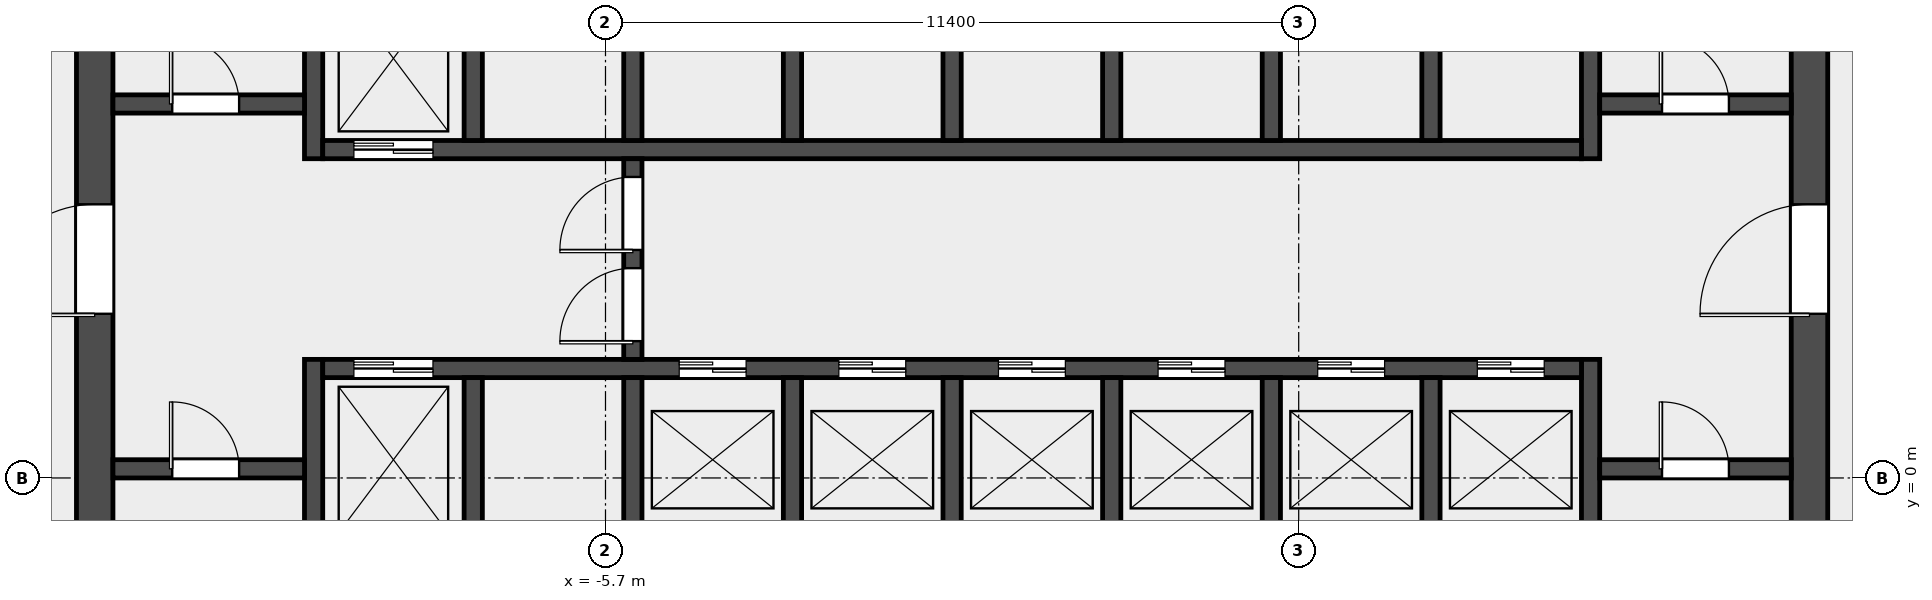
"""IFC4 building model, lengths in metres.
Left out: names, types, materials, properties, quantities, classifications, styles, units other than length and angle.
Written with IfcOpenShell. Run it as: python <this file> out.ifc"""

import sys

from ifc_helpers import new_model, si_unit, direction, frame, frame_2d, origin, place, context, subcontext, project, spatial, rectangle, extrude, element, fill, save


model = new_model("IFC4")
c1 = context("Model", 3, precision=1e-05, world=origin(), true_north=direction((0.0, 1.0)))
c2 = subcontext(c1, "Body", "Model", "MODEL_VIEW")
j1 = project(units=[si_unit("LENGTHUNIT", "METRE"), si_unit("PLANEANGLEUNIT", "RADIAN")], contexts=[c1])
p1 = place(None, origin())
s1 = spatial("IfcSite", under=j1, at=p1, CompositionType="ELEMENT")
p2 = place(p1, origin())
s2 = spatial("IfcBuilding", under=s1, at=p2, CompositionType="ELEMENT")
p3 = place(p2, frame((0.0, 0.0, 64.6)))
s3 = spatial("IfcBuildingStorey", under=s2, at=p3, CompositionType="ELEMENT", Elevation=64.6)
p4 = place(p3, frame((-14.1, -6.6, 0.0), z_axis=(0.0, 0.0, 1.0), x_axis=(0.0, 1.0, 0.0)))
e1 = element("IfcWall", 1, at=p4, inside=s3, PredefinedType="SHEAR", context=c2, shape_type="SweptSolid", body=[
    extrude(rectangle(XDim=19.5, YDim=0.6, at=frame_2d((9.75, 0.0))), origin(), (0.0, 0.0, 1.0), 4.5),
])
p5 = place(p4, frame((9.3, 0.0, 0.0)))
e2 = element("IfcOpeningElement", 2, at=p5, cuts=e1, PredefinedType="OPENING", context=c2, shape_type="SweptSolid", body=[
    extrude(rectangle(XDim=1.8, YDim=2.1, at=frame_2d((0.9, 1.05))), frame((0.0, 0.312, 0.0), z_axis=(0.0, -1.0, 0.0), x_axis=(1.0, 0.0, 0.0)), (0.0, 0.0, 1.0), 0.624),
])
p6 = place(p3, frame((14.1, -6.6, 0.0), z_axis=(0.0, 0.0, 1.0), x_axis=(0.0, 1.0, 0.0)))
e3 = element("IfcWall", 3, at=p6, inside=s3, PredefinedType="SHEAR", context=c2, shape_type="SweptSolid", body=[
    extrude(rectangle(XDim=19.5, YDim=0.6, at=frame_2d((9.75, 0.0))), origin(), (0.0, 0.0, 1.0), 4.5),
])
p7 = place(p6, frame((9.3, 0.0, 0.0)))
e4 = element("IfcOpeningElement", 4, at=p7, cuts=e3, PredefinedType="OPENING", context=c2, shape_type="SweptSolid", body=[
    extrude(rectangle(XDim=1.8, YDim=2.1, at=frame_2d((0.9, 1.05))), frame((0.0, 0.312, 0.0), z_axis=(0.0, -1.0, 0.0), x_axis=(1.0, 0.0, 0.0)), (0.0, 0.0, 1.0), 0.624),
])
p8 = place(p3, frame((-10.5, -6.6, 0.0), z_axis=(0.0, 0.0, 1.0), x_axis=(0.0, 1.0, 0.0)))
e5 = element("IfcWall", 5, at=p8, inside=s3, PredefinedType="SHEAR", context=c2, shape_type="SweptSolid", body=[
    extrude(rectangle(XDim=8.55, YDim=0.3, at=frame_2d((4.275, 0.0))), origin(), (0.0, 0.0, 1.0), 4.5),
])
p9 = place(p3, frame((-10.5, 5.25, 0.0), z_axis=(0.0, 0.0, 1.0), x_axis=(0.0, 1.0, 0.0)))
e6 = element("IfcWall", 6, at=p9, inside=s3, PredefinedType="SHEAR", context=c2, shape_type="SweptSolid", body=[
    extrude(rectangle(XDim=7.65, YDim=0.3, at=frame_2d((3.825, 0.0))), origin(), (0.0, 0.0, 1.0), 4.5),
])
p10 = place(p3, frame((10.5, -6.6, 0.0), z_axis=(0.0, 0.0, 1.0), x_axis=(0.0, 1.0, 0.0)))
e7 = element("IfcWall", 7, at=p10, inside=s3, PredefinedType="SHEAR", context=c2, shape_type="SweptSolid", body=[
    extrude(rectangle(XDim=8.55, YDim=0.3, at=frame_2d((4.275, 0.0))), origin(), (0.0, 0.0, 1.0), 4.5),
])
p11 = place(p3, frame((10.5, 5.25, 0.0), z_axis=(0.0, 0.0, 1.0), x_axis=(0.0, 1.0, 0.0)))
e8 = element("IfcWall", 8, at=p11, inside=s3, PredefinedType="SHEAR", context=c2, shape_type="SweptSolid", body=[
    extrude(rectangle(XDim=7.65, YDim=0.3, at=frame_2d((3.825, 0.0))), origin(), (0.0, 0.0, 1.0), 4.5),
])
p12 = place(p3, frame((-13.8, 0.15, 0.0), z_axis=(0.0, 0.0, 1.0), x_axis=(1.0, 0.0, 0.0)))
e9 = element("IfcWall", 9, at=p12, inside=s3, PredefinedType="SOLIDWALL", context=c2, shape_type="SweptSolid", body=[
    extrude(rectangle(XDim=3.15, YDim=0.3, at=frame_2d((1.575, 0.0))), origin(), (0.0, 0.0, 1.0), 4.5),
])
p13 = place(p12, frame((0.975, 0.0, 0.0)))
e10 = element("IfcOpeningElement", 10, at=p13, cuts=e9, PredefinedType="OPENING", context=c2, shape_type="SweptSolid", body=[
    extrude(rectangle(XDim=1.1, YDim=2.1, at=frame_2d((0.55, 1.05))), frame((0.0, 0.162, 0.0), z_axis=(0.0, -1.0, 0.0), x_axis=(1.0, 0.0, 0.0)), (0.0, 0.0, 1.0), 0.324),
])
p14 = place(p3, frame((-13.8, 6.15, 0.0), z_axis=(0.0, 0.0, 1.0), x_axis=(1.0, 0.0, 0.0)))
e11 = element("IfcWall", 11, at=p14, inside=s3, PredefinedType="SOLIDWALL", context=c2, shape_type="SweptSolid", body=[
    extrude(rectangle(XDim=3.15, YDim=0.3, at=frame_2d((1.575, 0.0))), origin(), (0.0, 0.0, 1.0), 4.5),
])
p15 = place(p14, frame((0.975, 0.0, 0.0)))
e12 = element("IfcOpeningElement", 12, at=p15, cuts=e11, PredefinedType="OPENING", context=c2, shape_type="SweptSolid", body=[
    extrude(rectangle(XDim=1.1, YDim=2.1, at=frame_2d((0.55, 1.05))), frame((0.0, 0.162, 0.0), z_axis=(0.0, -1.0, 0.0), x_axis=(1.0, 0.0, 0.0)), (0.0, 0.0, 1.0), 0.324),
])
p16 = place(p3, frame((10.65, 0.15, 0.0), z_axis=(0.0, 0.0, 1.0), x_axis=(1.0, 0.0, 0.0)))
e13 = element("IfcWall", 13, at=p16, inside=s3, PredefinedType="SOLIDWALL", context=c2, shape_type="SweptSolid", body=[
    extrude(rectangle(XDim=3.15, YDim=0.3, at=frame_2d((1.575, 0.0))), origin(), (0.0, 0.0, 1.0), 4.5),
])
p17 = place(p16, frame((1.025, 0.0, 0.0)))
e14 = element("IfcOpeningElement", 14, at=p17, cuts=e13, PredefinedType="OPENING", context=c2, shape_type="SweptSolid", body=[
    extrude(rectangle(XDim=1.1, YDim=2.1, at=frame_2d((0.55, 1.05))), frame((0.0, 0.162, 0.0), z_axis=(0.0, -1.0, 0.0), x_axis=(1.0, 0.0, 0.0)), (0.0, 0.0, 1.0), 0.324),
])
p18 = place(p3, frame((10.65, 6.15, 0.0), z_axis=(0.0, 0.0, 1.0), x_axis=(1.0, 0.0, 0.0)))
e15 = element("IfcWall", 15, at=p18, inside=s3, PredefinedType="SOLIDWALL", context=c2, shape_type="SweptSolid", body=[
    extrude(rectangle(XDim=3.15, YDim=0.3, at=frame_2d((1.575, 0.0))), origin(), (0.0, 0.0, 1.0), 4.5),
])
p19 = place(p18, frame((1.025, 0.0, 0.0)))
e16 = element("IfcOpeningElement", 16, at=p19, cuts=e15, PredefinedType="OPENING", context=c2, shape_type="SweptSolid", body=[
    extrude(rectangle(XDim=1.1, YDim=2.1, at=frame_2d((0.55, 1.05))), frame((0.0, 0.162, 0.0), z_axis=(0.0, -1.0, 0.0), x_axis=(1.0, 0.0, 0.0)), (0.0, 0.0, 1.0), 0.324),
])
p20 = place(p3, frame((-10.35, 1.8, 0.0), z_axis=(0.0, 0.0, 1.0), x_axis=(1.0, 0.0, 0.0)))
e17 = element("IfcWall", 17, at=p20, inside=s3, PredefinedType="SOLIDWALL", context=c2, shape_type="SweptSolid", body=[
    extrude(rectangle(XDim=20.7, YDim=0.3, at=frame_2d((10.35, 0.0))), origin(), (0.0, 0.0, 1.0), 4.5),
])
p21 = place(p20, frame((0.512, 0.0, 0.0)))
e18 = element("IfcOpeningElement", 18, at=p21, cuts=e17, PredefinedType="OPENING", context=c2, shape_type="SweptSolid", body=[
    extrude(rectangle(XDim=1.3, YDim=2.1, at=frame_2d((0.65, 1.05))), frame((0.0, 0.162, 0.0), z_axis=(0.0, -1.0, 0.0), x_axis=(1.0, 0.0, 0.0)), (0.0, 0.0, 1.0), 0.324),
])
p22 = place(p20, frame((5.863, 0.0, 0.0)))
e19 = element("IfcOpeningElement", 19, at=p22, cuts=e17, PredefinedType="OPENING", context=c2, shape_type="SweptSolid", body=[
    extrude(rectangle(XDim=1.1, YDim=2.1, at=frame_2d((0.55, 1.05))), frame((0.0, 0.162, 0.0), z_axis=(0.0, -1.0, 0.0), x_axis=(1.0, 0.0, 0.0)), (0.0, 0.0, 1.0), 0.324),
])
p23 = place(p20, frame((8.488, 0.0, 0.0)))
e20 = element("IfcOpeningElement", 20, at=p23, cuts=e17, PredefinedType="OPENING", context=c2, shape_type="SweptSolid", body=[
    extrude(rectangle(XDim=1.1, YDim=2.1, at=frame_2d((0.55, 1.05))), frame((0.0, 0.162, 0.0), z_axis=(0.0, -1.0, 0.0), x_axis=(1.0, 0.0, 0.0)), (0.0, 0.0, 1.0), 0.324),
])
p24 = place(p20, frame((11.113, 0.0, 0.0)))
e21 = element("IfcOpeningElement", 21, at=p24, cuts=e17, PredefinedType="OPENING", context=c2, shape_type="SweptSolid", body=[
    extrude(rectangle(XDim=1.1, YDim=2.1, at=frame_2d((0.55, 1.05))), frame((0.0, 0.162, 0.0), z_axis=(0.0, -1.0, 0.0), x_axis=(1.0, 0.0, 0.0)), (0.0, 0.0, 1.0), 0.324),
])
p25 = place(p20, frame((13.738, 0.0, 0.0)))
e22 = element("IfcOpeningElement", 22, at=p25, cuts=e17, PredefinedType="OPENING", context=c2, shape_type="SweptSolid", body=[
    extrude(rectangle(XDim=1.1, YDim=2.1, at=frame_2d((0.55, 1.05))), frame((0.0, 0.162, 0.0), z_axis=(0.0, -1.0, 0.0), x_axis=(1.0, 0.0, 0.0)), (0.0, 0.0, 1.0), 0.324),
])
p26 = place(p20, frame((16.363, 0.0, 0.0)))
e23 = element("IfcOpeningElement", 23, at=p26, cuts=e17, PredefinedType="OPENING", context=c2, shape_type="SweptSolid", body=[
    extrude(rectangle(XDim=1.1, YDim=2.1, at=frame_2d((0.55, 1.05))), frame((0.0, 0.162, 0.0), z_axis=(0.0, -1.0, 0.0), x_axis=(1.0, 0.0, 0.0)), (0.0, 0.0, 1.0), 0.324),
])
p27 = place(p20, frame((18.988, 0.0, 0.0)))
e24 = element("IfcOpeningElement", 24, at=p27, cuts=e17, PredefinedType="OPENING", context=c2, shape_type="SweptSolid", body=[
    extrude(rectangle(XDim=1.1, YDim=2.1, at=frame_2d((0.55, 1.05))), frame((0.0, 0.162, 0.0), z_axis=(0.0, -1.0, 0.0), x_axis=(1.0, 0.0, 0.0)), (0.0, 0.0, 1.0), 0.324),
])
p28 = place(p3, frame((-10.35, 5.4, 0.0), z_axis=(0.0, 0.0, 1.0), x_axis=(1.0, 0.0, 0.0)))
e25 = element("IfcWall", 25, at=p28, inside=s3, PredefinedType="SOLIDWALL", context=c2, shape_type="SweptSolid", body=[
    extrude(rectangle(XDim=20.7, YDim=0.3, at=frame_2d((10.35, 0.0))), origin(), (0.0, 0.0, 1.0), 4.5),
])
p29 = place(p28, frame((0.512, 0.0, 0.0)))
e26 = element("IfcOpeningElement", 26, at=p29, cuts=e25, PredefinedType="OPENING", context=c2, shape_type="SweptSolid", body=[
    extrude(rectangle(XDim=1.3, YDim=2.1, at=frame_2d((0.65, 1.05))), frame((0.0, 0.162, 0.0), z_axis=(0.0, -1.0, 0.0), x_axis=(1.0, 0.0, 0.0)), (0.0, 0.0, 1.0), 0.324),
])
for number, where, z_axis, x_axis in (
    (27, (-7.875, -1.05, 0.0), (0.0, 0.0, 1.0), (0.0, 1.0, 0.0)),
    (28, (-5.25, -1.05, 0.0), (0.0, 0.0, 1.0), (0.0, 1.0, 0.0)),
    (29, (-2.625, -1.05, 0.0), (0.0, 0.0, 1.0), (0.0, 1.0, 0.0)),
    (30, (0.0, -1.05, 0.0), (0.0, 0.0, 1.0), (0.0, 1.0, 0.0)),
    (31, (2.625, -1.05, 0.0), (0.0, 0.0, 1.0), (0.0, 1.0, 0.0)),
    (32, (5.25, -1.05, 0.0), (0.0, 0.0, 1.0), (0.0, 1.0, 0.0)),
    (33, (7.875, -1.05, 0.0), (0.0, 0.0, 1.0), (0.0, 1.0, 0.0)),
    (34, (-7.875, 5.55, 0.0), (0.0, 0.0, 1.0), (0.0, 1.0, 0.0)),
    (35, (-5.25, 5.55, 0.0), (0.0, 0.0, 1.0), (0.0, 1.0, 0.0)),
    (36, (-2.625, 5.55, 0.0), (0.0, 0.0, 1.0), (0.0, 1.0, 0.0)),
    (37, (0.0, 5.55, 0.0), (0.0, 0.0, 1.0), (0.0, 1.0, 0.0)),
    (38, (2.625, 5.55, 0.0), (0.0, 0.0, 1.0), (0.0, 1.0, 0.0)),
    (39, (5.25, 5.55, 0.0), (0.0, 0.0, 1.0), (0.0, 1.0, 0.0)),
    (40, (7.875, 5.55, 0.0), (0.0, 0.0, 1.0), (0.0, 1.0, 0.0)),
):
    element("IfcWall", number, at=place(p3, frame(where, z_axis=z_axis, x_axis=x_axis)), inside=s3, PredefinedType="SOLIDWALL", context=c2, shape_type="SweptSolid", body=[
        extrude(rectangle(XDim=2.7, YDim=0.3, at=frame_2d((1.35, 0.0))), origin(), (0.0, 0.0, 1.0), 4.5),
    ])
p30 = place(p3, frame((-5.25, 1.95, 0.0), z_axis=(0.0, 0.0, 1.0), x_axis=(0.0, 1.0, 0.0)))
e41 = element("IfcWall", 41, at=p30, inside=s3, PredefinedType="SOLIDWALL", context=c2, shape_type="SweptSolid", body=[
    extrude(rectangle(XDim=3.3, YDim=0.3, at=frame_2d((1.65, 0.0))), origin(), (0.0, 0.0, 1.0), 4.5),
])
p31 = place(p30, frame((0.3, 0.0, 0.0)))
e42 = element("IfcOpeningElement", 42, at=p31, cuts=e41, PredefinedType="OPENING", context=c2, shape_type="SweptSolid", body=[
    extrude(rectangle(XDim=1.2, YDim=2.1, at=frame_2d((0.6, 1.05))), frame((0.0, 0.162, 0.0), z_axis=(0.0, -1.0, 0.0), x_axis=(1.0, 0.0, 0.0)), (0.0, 0.0, 1.0), 0.324),
])
p32 = place(p30, frame((1.8, 0.0, 0.0)))
e43 = element("IfcOpeningElement", 43, at=p32, cuts=e41, PredefinedType="OPENING", context=c2, shape_type="SweptSolid", body=[
    extrude(rectangle(XDim=1.2, YDim=2.1, at=frame_2d((0.6, 1.05))), frame((0.0, 0.162, 0.0), z_axis=(0.0, -1.0, 0.0), x_axis=(1.0, 0.0, 0.0)), (0.0, 0.0, 1.0), 0.324),
])
p33 = place(p13, origin())
e44 = element("IfcDoor", 44, at=p33, inside=s3, OperationType="SINGLE_SWING_LEFT", PredefinedType="DOOR", context=c2, shape_type="SweptSolid", body=[
    extrude(rectangle(XDim=1.1, YDim=2.1, at=frame_2d((0.55, 1.05))), frame((0.0, 0.025, 0.0), z_axis=(0.0, -1.0, 0.0), x_axis=(1.0, 0.0, 0.0)), (0.0, 0.0, 1.0), 0.05),
])
fill(e10, e44)
p34 = place(p15, origin())
e45 = element("IfcDoor", 45, at=p34, inside=s3, OperationType="SINGLE_SWING_LEFT", PredefinedType="DOOR", context=c2, shape_type="SweptSolid", body=[
    extrude(rectangle(XDim=1.1, YDim=2.1, at=frame_2d((0.55, 1.05))), frame((0.0, 0.025, 0.0), z_axis=(0.0, -1.0, 0.0), x_axis=(1.0, 0.0, 0.0)), (0.0, 0.0, 1.0), 0.05),
])
fill(e12, e45)
p35 = place(p17, origin())
e46 = element("IfcDoor", 46, at=p35, inside=s3, OperationType="SINGLE_SWING_RIGHT", PredefinedType="DOOR", context=c2, shape_type="SweptSolid", body=[
    extrude(rectangle(XDim=1.1, YDim=2.1, at=frame_2d((0.55, 1.05))), frame((0.0, 0.025, 0.0), z_axis=(0.0, -1.0, 0.0), x_axis=(1.0, 0.0, 0.0)), (0.0, 0.0, 1.0), 0.05),
])
fill(e14, e46)
p36 = place(p19, origin())
e47 = element("IfcDoor", 47, at=p36, inside=s3, OperationType="SINGLE_SWING_RIGHT", PredefinedType="DOOR", context=c2, shape_type="SweptSolid", body=[
    extrude(rectangle(XDim=1.1, YDim=2.1, at=frame_2d((0.55, 1.05))), frame((0.0, 0.025, 0.0), z_axis=(0.0, -1.0, 0.0), x_axis=(1.0, 0.0, 0.0)), (0.0, 0.0, 1.0), 0.05),
])
fill(e16, e47)
p37 = place(p5, origin())
e48 = element("IfcDoor", 48, at=p37, inside=s3, OperationType="DOUBLE_DOOR_SINGLE_SWING", PredefinedType="DOOR", context=c2, shape_type="SweptSolid", body=[
    extrude(rectangle(XDim=1.8, YDim=2.1, at=frame_2d((0.9, 1.05))), frame((0.0, 0.025, 0.0), z_axis=(0.0, -1.0, 0.0), x_axis=(1.0, 0.0, 0.0)), (0.0, 0.0, 1.0), 0.05),
])
fill(e2, e48)
p38 = place(p7, origin())
e49 = element("IfcDoor", 49, at=p38, inside=s3, OperationType="DOUBLE_DOOR_SINGLE_SWING", PredefinedType="DOOR", context=c2, shape_type="SweptSolid", body=[
    extrude(rectangle(XDim=1.8, YDim=2.1, at=frame_2d((0.9, 1.05))), frame((0.0, 0.025, 0.0), z_axis=(0.0, -1.0, 0.0), x_axis=(1.0, 0.0, 0.0)), (0.0, 0.0, 1.0), 0.05),
])
fill(e4, e49)
p39 = place(p31, origin())
e50 = element("IfcDoor", 50, at=p39, inside=s3, OperationType="SINGLE_SWING_LEFT", PredefinedType="DOOR", context=c2, shape_type="SweptSolid", body=[
    extrude(rectangle(XDim=1.2, YDim=2.1, at=frame_2d((0.6, 1.05))), frame((0.0, 0.025, 0.0), z_axis=(0.0, -1.0, 0.0), x_axis=(1.0, 0.0, 0.0)), (0.0, 0.0, 1.0), 0.05),
])
fill(e42, e50)
p40 = place(p32, origin())
e51 = element("IfcDoor", 51, at=p40, inside=s3, OperationType="SINGLE_SWING_RIGHT", PredefinedType="DOOR", context=c2, shape_type="SweptSolid", body=[
    extrude(rectangle(XDim=1.2, YDim=2.1, at=frame_2d((0.6, 1.05))), frame((0.0, 0.025, 0.0), z_axis=(0.0, -1.0, 0.0), x_axis=(1.0, 0.0, 0.0)), (0.0, 0.0, 1.0), 0.05),
])
fill(e43, e51)
p41 = place(p21, origin())
e52 = element("IfcDoor", 52, at=p41, inside=s3, OperationType="DOUBLE_DOOR_SLIDING", PredefinedType="DOOR", context=c2, shape_type="SweptSolid", body=[
    extrude(rectangle(XDim=1.3, YDim=2.1, at=frame_2d((0.65, 1.05))), frame((0.0, 0.025, 0.0), z_axis=(0.0, -1.0, 0.0), x_axis=(1.0, 0.0, 0.0)), (0.0, 0.0, 1.0), 0.05),
])
fill(e18, e52)
p42 = place(p22, origin())
e53 = element("IfcDoor", 53, at=p42, inside=s3, OperationType="DOUBLE_DOOR_SLIDING", PredefinedType="DOOR", context=c2, shape_type="SweptSolid", body=[
    extrude(rectangle(XDim=1.1, YDim=2.1, at=frame_2d((0.55, 1.05))), frame((0.0, 0.025, 0.0), z_axis=(0.0, -1.0, 0.0), x_axis=(1.0, 0.0, 0.0)), (0.0, 0.0, 1.0), 0.05),
])
fill(e19, e53)
p43 = place(p23, origin())
e54 = element("IfcDoor", 54, at=p43, inside=s3, OperationType="DOUBLE_DOOR_SLIDING", PredefinedType="DOOR", context=c2, shape_type="SweptSolid", body=[
    extrude(rectangle(XDim=1.1, YDim=2.1, at=frame_2d((0.55, 1.05))), frame((0.0, 0.025, 0.0), z_axis=(0.0, -1.0, 0.0), x_axis=(1.0, 0.0, 0.0)), (0.0, 0.0, 1.0), 0.05),
])
fill(e20, e54)
p44 = place(p24, origin())
e55 = element("IfcDoor", 55, at=p44, inside=s3, OperationType="DOUBLE_DOOR_SLIDING", PredefinedType="DOOR", context=c2, shape_type="SweptSolid", body=[
    extrude(rectangle(XDim=1.1, YDim=2.1, at=frame_2d((0.55, 1.05))), frame((0.0, 0.025, 0.0), z_axis=(0.0, -1.0, 0.0), x_axis=(1.0, 0.0, 0.0)), (0.0, 0.0, 1.0), 0.05),
])
fill(e21, e55)
p45 = place(p25, origin())
e56 = element("IfcDoor", 56, at=p45, inside=s3, OperationType="DOUBLE_DOOR_SLIDING", PredefinedType="DOOR", context=c2, shape_type="SweptSolid", body=[
    extrude(rectangle(XDim=1.1, YDim=2.1, at=frame_2d((0.55, 1.05))), frame((0.0, 0.025, 0.0), z_axis=(0.0, -1.0, 0.0), x_axis=(1.0, 0.0, 0.0)), (0.0, 0.0, 1.0), 0.05),
])
fill(e22, e56)
p46 = place(p26, origin())
e57 = element("IfcDoor", 57, at=p46, inside=s3, OperationType="DOUBLE_DOOR_SLIDING", PredefinedType="DOOR", context=c2, shape_type="SweptSolid", body=[
    extrude(rectangle(XDim=1.1, YDim=2.1, at=frame_2d((0.55, 1.05))), frame((0.0, 0.025, 0.0), z_axis=(0.0, -1.0, 0.0), x_axis=(1.0, 0.0, 0.0)), (0.0, 0.0, 1.0), 0.05),
])
fill(e23, e57)
p47 = place(p27, origin())
e58 = element("IfcDoor", 58, at=p47, inside=s3, OperationType="DOUBLE_DOOR_SLIDING", PredefinedType="DOOR", context=c2, shape_type="SweptSolid", body=[
    extrude(rectangle(XDim=1.1, YDim=2.1, at=frame_2d((0.55, 1.05))), frame((0.0, 0.025, 0.0), z_axis=(0.0, -1.0, 0.0), x_axis=(1.0, 0.0, 0.0)), (0.0, 0.0, 1.0), 0.05),
])
fill(e24, e58)
p48 = place(p29, origin())
e59 = element("IfcDoor", 59, at=p48, inside=s3, OperationType="DOUBLE_DOOR_SLIDING", PredefinedType="DOOR", context=c2, shape_type="SweptSolid", body=[
    extrude(rectangle(XDim=1.3, YDim=2.1, at=frame_2d((0.65, 1.05))), frame((0.0, 0.025, 0.0), z_axis=(0.0, -1.0, 0.0), x_axis=(1.0, 0.0, 0.0)), (0.0, 0.0, 1.0), 0.05),
])
fill(e26, e59)
save(model, sys.argv[1])
